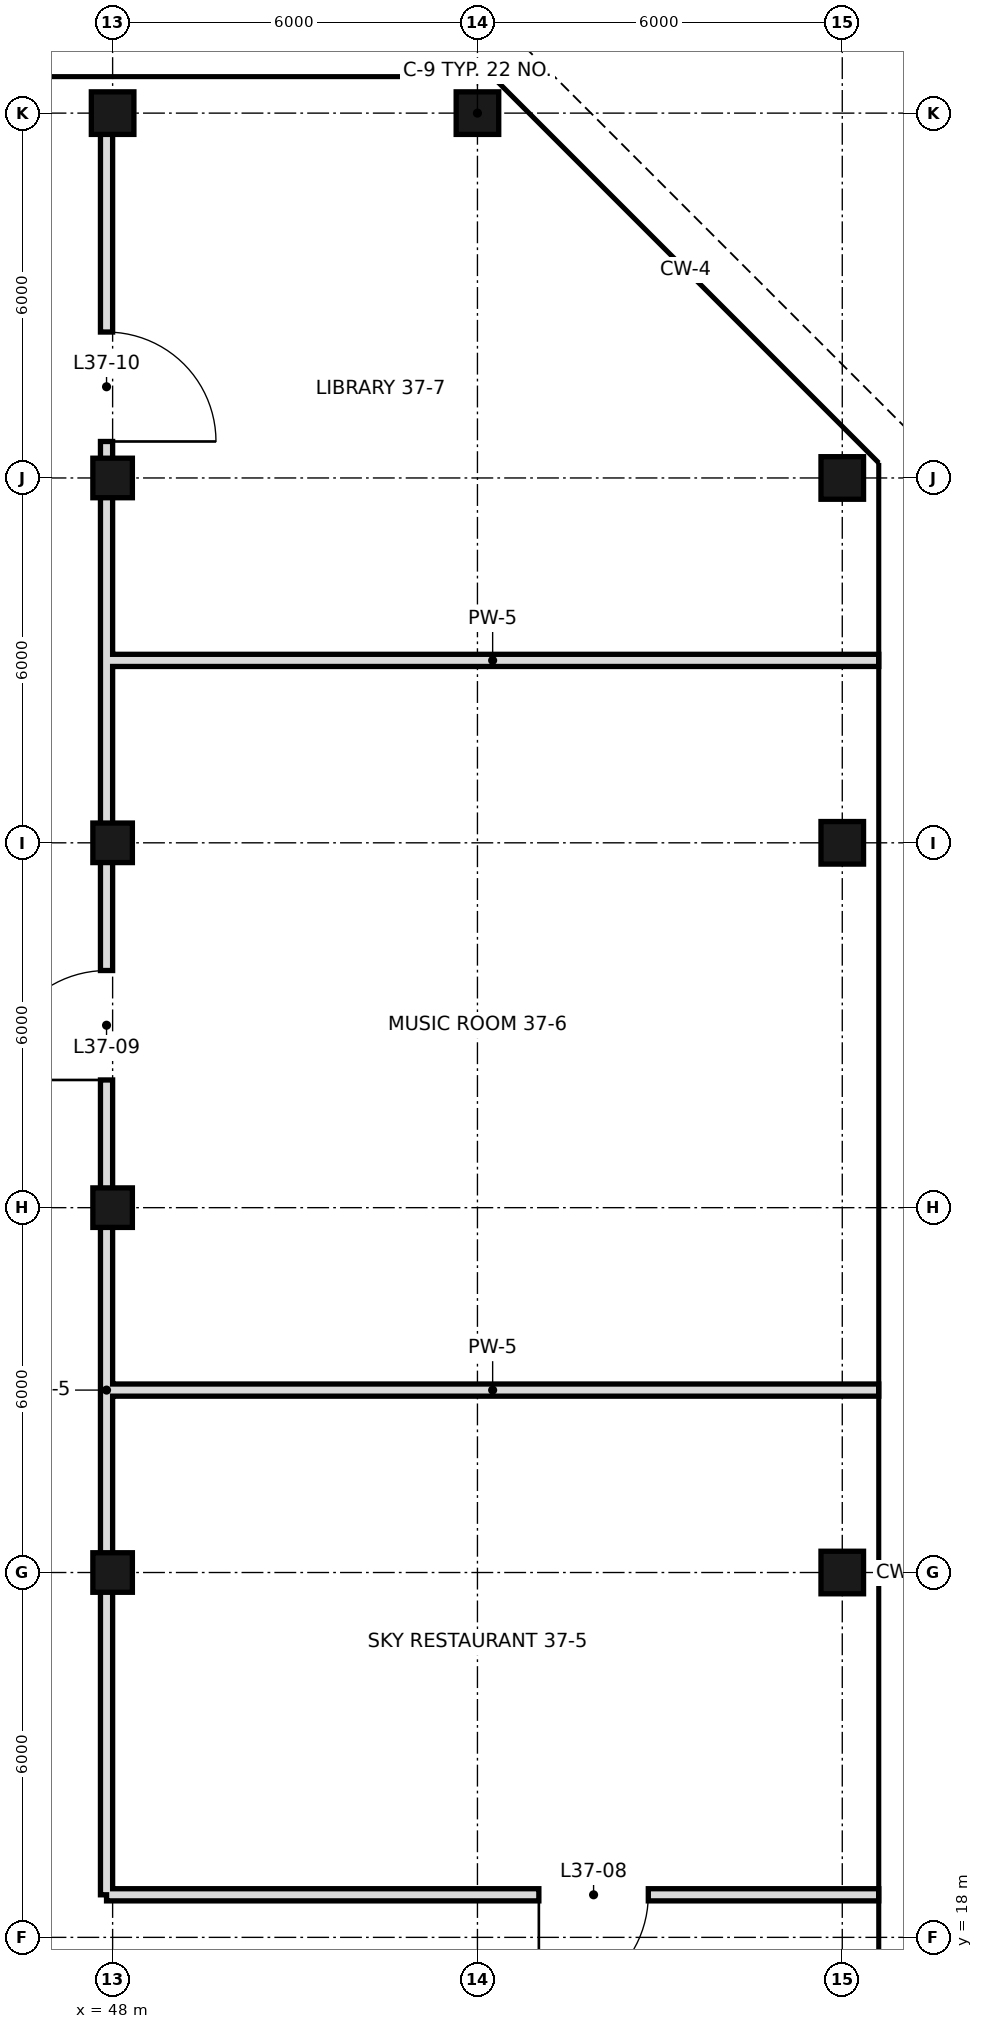
"""IFC4 building model, lengths in metres.
Left out: names, types, materials, properties, quantities, classifications, styles, units other than length and angle.
Written with IfcOpenShell. Run it as: python <this file> out.ifc"""

import sys

from ifc_helpers import new_model, si_unit, direction, frame, frame_2d, origin, origin_2d, place, context, subcontext, project, spatial, rectangle, hollow_rectangle, extrude, element, fill, save


model = new_model("IFC4")
c1 = context("Model", 3, precision=1e-05, world=origin(), true_north=direction((0.0, 1.0)))
c2 = subcontext(c1, "Body", "Model", "MODEL_VIEW")
j1 = project(units=[si_unit("LENGTHUNIT", "METRE"), si_unit("PLANEANGLEUNIT", "RADIAN")], contexts=[c1])
p1 = place(None, origin())
s1 = spatial("IfcSite", under=j1, at=p1, CompositionType="ELEMENT")
p2 = place(p1, origin())
s2 = spatial("IfcBuilding", under=s1, at=p2, CompositionType="ELEMENT")
p3 = place(p2, frame((0.0, 0.0, 161.8)))
s3 = spatial("IfcBuildingStorey", under=s2, at=p3, CompositionType="ELEMENT", Elevation=161.8)
for number, where, z_axis, x_axis in (
    (1, (48.0, 24.0, 0.0), (0.0, 0.0, 1.0), (1.0, 0.0, 0.0)),
    (2, (48.0, 30.0, 0.0), (0.0, 0.0, 1.0), (1.0, 0.0, 0.0)),
    (3, (48.0, 36.0, 0.0), (0.0, 0.0, 1.0), (1.0, 0.0, 0.0)),
    (4, (48.0, 42.0, 0.0), (0.0, 0.0, 1.0), (1.0, 0.0, 0.0)),
):
    element("IfcColumn", number, at=place(p3, frame(where, z_axis=z_axis, x_axis=x_axis)), inside=s3, PredefinedType="COLUMN", context=c2, shape_type="SweptSolid", body=[
        extrude(hollow_rectangle(XDim=0.65, YDim=0.65, WallThickness=0.032, at=origin_2d()), origin(), (0.0, 0.0, 1.0), 5.4),
    ])
for number, where, z_axis, x_axis in (
    (5, (48.0, 48.0, 0.0), (0.0, 0.0, 1.0), (1.0, 0.0, 0.0)),
    (6, (54.0, 48.0, 0.0), (0.0, 0.0, 1.0), (1.0, 0.0, 0.0)),
    (7, (60.0, 24.0, 0.0), (0.0, 0.0, 1.0), (1.0, 0.0, 0.0)),
    (8, (60.0, 36.0, 0.0), (0.0, 0.0, 1.0), (1.0, 0.0, 0.0)),
    (9, (60.0, 42.0, 0.0), (0.0, 0.0, 1.0), (1.0, 0.0, 0.0)),
):
    element("IfcColumn", number, at=place(p3, frame(where, z_axis=z_axis, x_axis=x_axis)), inside=s3, PredefinedType="COLUMN", context=c2, shape_type="SweptSolid", body=[
        extrude(hollow_rectangle(XDim=0.7, YDim=0.7, WallThickness=0.036, at=origin_2d()), origin(), (0.0, 0.0, 1.0), 5.4),
    ])
p4 = place(p3, frame((47.9, 18.7, 0.0), z_axis=(0.0, 0.0, 1.0), x_axis=(0.0, 1.0, 0.0)))
e10 = element("IfcWall", 10, at=p4, inside=s3, PredefinedType="SOLIDWALL", context=c2, shape_type="SweptSolid", body=[
    extrude(rectangle(XDim=29.3, YDim=0.2, at=frame_2d((14.65, 0.0))), origin(), (0.0, 0.0, 1.0), 4.52),
])
p5 = place(p4, frame((13.4, 0.0, 0.0)))
e11 = element("IfcOpeningElement", 11, at=p5, cuts=e10, PredefinedType="OPENING", context=c2, shape_type="SweptSolid", body=[
    extrude(rectangle(XDim=1.8, YDim=2.4, at=frame_2d((0.9, 1.2))), frame((0.0, 0.11, 0.0), z_axis=(0.0, -1.0, 0.0), x_axis=(1.0, 0.0, 0.0)), (0.0, 0.0, 1.0), 0.22),
])
p6 = place(p4, frame((23.9, 0.0, 0.0)))
e12 = element("IfcOpeningElement", 12, at=p6, cuts=e10, PredefinedType="OPENING", context=c2, shape_type="SweptSolid", body=[
    extrude(rectangle(XDim=1.8, YDim=2.4, at=frame_2d((0.9, 1.2))), frame((0.0, 0.11, 0.0), z_axis=(0.0, -1.0, 0.0), x_axis=(1.0, 0.0, 0.0)), (0.0, 0.0, 1.0), 0.22),
])
p7 = place(p3, frame((47.9, 18.7, 0.0), z_axis=(0.0, 0.0, 1.0), x_axis=(1.0, 0.0, 0.0)))
e13 = element("IfcWall", 13, at=p7, inside=s3, PredefinedType="SOLIDWALL", context=c2, shape_type="SweptSolid", body=[
    extrude(rectangle(XDim=12.7, YDim=0.2, at=frame_2d((6.35, 0.0))), origin(), (0.0, 0.0, 1.0), 4.52),
])
p8 = place(p7, frame((7.11, 0.0, 0.0)))
e14 = element("IfcOpeningElement", 14, at=p8, cuts=e13, PredefinedType="OPENING", context=c2, shape_type="SweptSolid", body=[
    extrude(rectangle(XDim=1.8, YDim=2.4, at=frame_2d((0.9, 1.2))), frame((0.0, 0.11, 0.0), z_axis=(0.0, -1.0, 0.0), x_axis=(1.0, 0.0, 0.0)), (0.0, 0.0, 1.0), 0.22),
])
p9 = place(p3, frame((47.9, 27.0, 0.0), z_axis=(0.0, 0.0, 1.0), x_axis=(1.0, 0.0, 0.0)))
e15 = element("IfcWall", 15, at=p9, inside=s3, PredefinedType="SOLIDWALL", context=c2, shape_type="SweptSolid", body=[
    extrude(rectangle(XDim=12.7, YDim=0.2, at=frame_2d((6.35, 0.0))), origin(), (0.0, 0.0, 1.0), 4.52),
])
p10 = place(p3, frame((47.9, 39.0, 0.0), z_axis=(0.0, 0.0, 1.0), x_axis=(1.0, 0.0, 0.0)))
e16 = element("IfcWall", 16, at=p10, inside=s3, PredefinedType="SOLIDWALL", context=c2, shape_type="SweptSolid", body=[
    extrude(rectangle(XDim=12.7, YDim=0.2, at=frame_2d((6.35, 0.0))), origin(), (0.0, 0.0, 1.0), 4.77),
])
p11 = place(p8, frame((1.8, 0.0, 0.0), z_axis=(0.0, 0.0, 1.0), x_axis=(-1.0, 0.0, 0.0)))
e17 = element("IfcDoor", 17, at=p11, inside=s3, OperationType="SINGLE_SWING_RIGHT", PredefinedType="DOOR", context=c2, shape_type="SweptSolid", body=[
    extrude(rectangle(XDim=1.8, YDim=2.4, at=frame_2d((0.9, 1.2))), frame((0.0, 0.025, 0.0), z_axis=(0.0, -1.0, 0.0), x_axis=(1.0, 0.0, 0.0)), (0.0, 0.0, 1.0), 0.05),
])
fill(e14, e17)
p12 = place(p5, origin())
e18 = element("IfcDoor", 18, at=p12, inside=s3, OperationType="SINGLE_SWING_LEFT", PredefinedType="DOOR", context=c2, shape_type="SweptSolid", body=[
    extrude(rectangle(XDim=1.8, YDim=2.4, at=frame_2d((0.9, 1.2))), frame((0.0, 0.025, 0.0), z_axis=(0.0, -1.0, 0.0), x_axis=(1.0, 0.0, 0.0)), (0.0, 0.0, 1.0), 0.05),
])
fill(e11, e18)
p13 = place(p6, frame((1.8, 0.0, 0.0), z_axis=(0.0, 0.0, 1.0), x_axis=(-1.0, 0.0, 0.0)))
e19 = element("IfcDoor", 19, at=p13, inside=s3, OperationType="SINGLE_SWING_RIGHT", PredefinedType="DOOR", context=c2, shape_type="SweptSolid", body=[
    extrude(rectangle(XDim=1.8, YDim=2.4, at=frame_2d((0.9, 1.2))), frame((0.0, 0.025, 0.0), z_axis=(0.0, -1.0, 0.0), x_axis=(1.0, 0.0, 0.0)), (0.0, 0.0, 1.0), 0.05),
])
fill(e12, e19)
save(model, sys.argv[1])
